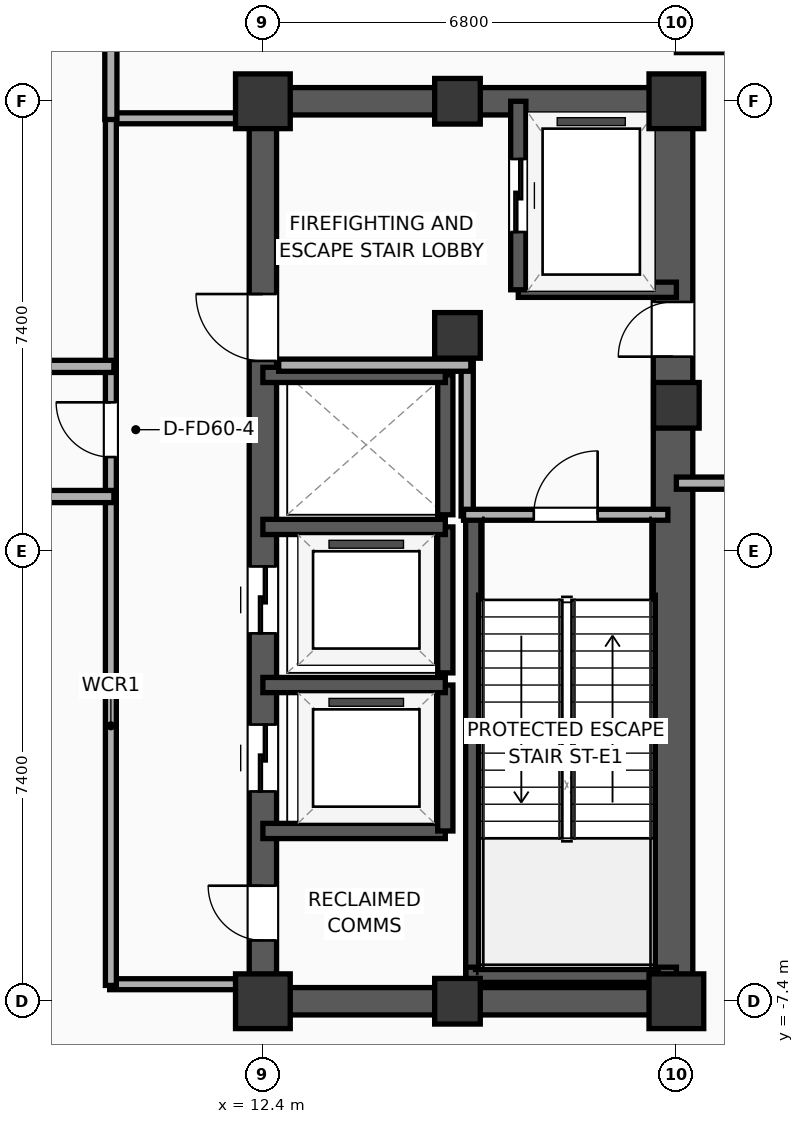
"""IFC4 building model, lengths in metres.
Left out: names, types, materials, properties, quantities, classifications, styles, units other than length and angle.
Written with IfcOpenShell. Run it as: python <this file> out.ifc"""

import sys

from ifc_helpers import new_model, si_unit, direction, frame, frame_2d, origin, origin_2d, place, context, subcontext, project, spatial, rectangle, extrude, element, fill, save


model = new_model("IFC4")
c1 = context("Model", 3, precision=1e-05, world=origin(), true_north=direction((0.0, 1.0)))
c2 = subcontext(c1, "Body", "Model", "MODEL_VIEW")
j1 = project(units=[si_unit("LENGTHUNIT", "METRE"), si_unit("PLANEANGLEUNIT", "RADIAN")], contexts=[c1])
p1 = place(None, origin())
s1 = spatial("IfcSite", under=j1, at=p1, CompositionType="ELEMENT")
p2 = place(p1, origin())
s2 = spatial("IfcBuilding", under=s1, at=p2, CompositionType="ELEMENT")
p3 = place(p2, frame((0.0, 0.0, 195.0)))
s3 = spatial("IfcBuildingStorey", under=s2, at=p3, CompositionType="ELEMENT", Elevation=195.0)
p4 = place(p3, frame((12.4, -7.4, 0.0), z_axis=(0.0, 0.0, 1.0), x_axis=(1.0, 0.0, 0.0)))
e1 = element("IfcColumn", 1, at=p4, inside=s3, PredefinedType="COLUMN", context=c2, shape_type="SweptSolid", body=[
    extrude(rectangle(XDim=0.9, YDim=0.9, at=origin_2d()), origin(), (0.0, 0.0, 1.0), 5.2),
])
p5 = place(p3, frame((15.6, 3.55, 0.0), z_axis=(0.0, 0.0, 1.0), x_axis=(1.0, 0.0, 0.0)))
e2 = element("IfcColumn", 2, at=p5, inside=s3, PredefinedType="COLUMN", context=c2, shape_type="SweptSolid", body=[
    extrude(rectangle(XDim=0.75, YDim=0.75, at=origin_2d()), origin(), (0.0, 0.0, 1.0), 5.2),
])
p6 = place(p3, frame((12.4, 7.4, 0.0), z_axis=(0.0, 0.0, 1.0), x_axis=(1.0, 0.0, 0.0)))
e3 = element("IfcColumn", 3, at=p6, inside=s3, PredefinedType="COLUMN", context=c2, shape_type="SweptSolid", body=[
    extrude(rectangle(XDim=0.9, YDim=0.9, at=origin_2d()), origin(), (0.0, 0.0, 1.0), 5.2),
])
for number, where, z_axis, x_axis in (
    (4, (15.6, -7.4, 0.0), (0.0, 0.0, 1.0), (1.0, 0.0, 0.0)),
    (5, (15.6, 7.4, 0.0), (0.0, 0.0, 1.0), (1.0, 0.0, 0.0)),
):
    element("IfcColumn", number, at=place(p3, frame(where, z_axis=z_axis, x_axis=x_axis)), inside=s3, PredefinedType="COLUMN", context=c2, shape_type="SweptSolid", body=[
        extrude(rectangle(XDim=0.75, YDim=0.75, at=origin_2d()), origin(), (0.0, 0.0, 1.0), 5.2),
    ])
p7 = place(p3, frame((19.2, -7.4, 0.0), z_axis=(0.0, 0.0, 1.0), x_axis=(1.0, 0.0, 0.0)))
e6 = element("IfcColumn", 6, at=p7, inside=s3, PredefinedType="COLUMN", context=c2, shape_type="SweptSolid", body=[
    extrude(rectangle(XDim=0.9, YDim=0.9, at=origin_2d()), origin(), (0.0, 0.0, 1.0), 5.2),
])
p8 = place(p3, frame((19.2, 2.4, 0.0), z_axis=(0.0, 0.0, 1.0), x_axis=(1.0, 0.0, 0.0)))
e7 = element("IfcColumn", 7, at=p8, inside=s3, PredefinedType="COLUMN", context=c2, shape_type="SweptSolid", body=[
    extrude(rectangle(XDim=0.75, YDim=0.75, at=origin_2d()), origin(), (0.0, 0.0, 1.0), 5.2),
])
p9 = place(p3, frame((19.2, 7.4, 0.0), z_axis=(0.0, 0.0, 1.0), x_axis=(1.0, 0.0, 0.0)))
e8 = element("IfcColumn", 8, at=p9, inside=s3, PredefinedType="COLUMN", context=c2, shape_type="SweptSolid", body=[
    extrude(rectangle(XDim=0.9, YDim=0.9, at=origin_2d()), origin(), (0.0, 0.0, 1.0), 5.2),
])
for number, where, z_axis, x_axis in (
    (9, (12.175, -7.4, 0.0), (0.0, 0.0, 1.0), (1.0, 0.0, 0.0)),
    (10, (12.175, 7.4, 0.0), (0.0, 0.0, 1.0), (1.0, 0.0, 0.0)),
):
    element("IfcWall", number, at=place(p3, frame(where, z_axis=z_axis, x_axis=x_axis)), inside=s3, PredefinedType="SHEAR", context=c2, shape_type="SweptSolid", body=[
        extrude(rectangle(XDim=7.25, YDim=0.45, at=frame_2d((3.625, 0.0))), origin(), (0.0, 0.0, 1.0), 4.8),
    ])
p10 = place(p3, frame((12.4, -7.4, 0.0), z_axis=(0.0, 0.0, 1.0), x_axis=(0.0, 1.0, 0.0)))
e11 = element("IfcWall", 11, at=p10, inside=s3, PredefinedType="SHEAR", context=c2, shape_type="SweptSolid", body=[
    extrude(rectangle(XDim=14.8, YDim=0.45, at=frame_2d((7.4, 0.0))), origin(), (0.0, 0.0, 1.0), 4.8),
])
p11 = place(p10, frame((3.45, 0.0, 0.0)))
e12 = element("IfcOpeningElement", 12, at=p11, cuts=e11, PredefinedType="OPENING", context=c2, shape_type="SweptSolid", body=[
    extrude(rectangle(XDim=1.1, YDim=2.05, at=frame_2d((0.55, 1.025))), frame((0.0, 0.235, 0.0), z_axis=(0.0, -1.0, 0.0), x_axis=(1.0, 0.0, 0.0)), (0.0, 0.0, 1.0), 0.47),
])
p12 = place(p10, frame((6.05, 0.0, 0.0)))
e13 = element("IfcOpeningElement", 13, at=p12, cuts=e11, PredefinedType="OPENING", context=c2, shape_type="SweptSolid", body=[
    extrude(rectangle(XDim=1.1, YDim=2.05, at=frame_2d((0.55, 1.025))), frame((0.0, 0.235, 0.0), z_axis=(0.0, -1.0, 0.0), x_axis=(1.0, 0.0, 0.0)), (0.0, 0.0, 1.0), 0.47),
])
p13 = place(p10, frame((10.53, 0.0, 0.0)))
e14 = element("IfcOpeningElement", 14, at=p13, cuts=e11, PredefinedType="OPENING", context=c2, shape_type="SweptSolid", body=[
    extrude(rectangle(XDim=1.1, YDim=2.05, at=frame_2d((0.55, 1.025))), frame((0.0, 0.235, 0.0), z_axis=(0.0, -1.0, 0.0), x_axis=(1.0, 0.0, 0.0)), (0.0, 0.0, 1.0), 0.47),
])
p14 = place(p10, frame((1.0, 0.0, 0.0)))
e15 = element("IfcOpeningElement", 15, at=p14, cuts=e11, PredefinedType="OPENING", context=c2, shape_type="SweptSolid", body=[
    extrude(rectangle(XDim=0.9, YDim=2.05, at=frame_2d((0.45, 1.025))), frame((0.0, 0.235, 0.0), z_axis=(0.0, -1.0, 0.0), x_axis=(1.0, 0.0, 0.0)), (0.0, 0.0, 1.0), 0.47),
])
p15 = place(p3, frame((19.145, -7.4, 0.0), z_axis=(0.0, 0.0, 1.0), x_axis=(0.0, 1.0, 0.0)))
e16 = element("IfcWall", 16, at=p15, inside=s3, PredefinedType="SHEAR", context=c2, shape_type="SweptSolid", body=[
    extrude(rectangle(XDim=14.8, YDim=0.65, at=frame_2d((7.4, 0.0))), origin(), (0.0, 0.0, 1.0), 4.8),
])
p16 = place(p15, frame((10.6, 0.0, 0.0)))
e17 = element("IfcOpeningElement", 17, at=p16, cuts=e16, PredefinedType="OPENING", context=c2, shape_type="SweptSolid", body=[
    extrude(rectangle(XDim=0.9, YDim=2.05, at=frame_2d((0.45, 1.025))), frame((0.0, 0.335, 0.0), z_axis=(0.0, -1.0, 0.0), x_axis=(1.0, 0.0, 0.0)), (0.0, 0.0, 1.0), 0.67),
])
p17 = place(p3, frame((15.86, -7.085, 0.0), z_axis=(0.0, 0.0, 1.0), x_axis=(0.0, 1.0, 0.0)))
e18 = element("IfcWall", 18, at=p17, inside=s3, PredefinedType="SOLIDWALL", context=c2, shape_type="SweptSolid", body=[
    extrude(rectangle(XDim=7.685, YDim=0.25, at=frame_2d((3.843, 0.0))), origin(), (0.0, 0.0, 1.0), 4.8),
])
p18 = place(p3, frame((15.74, -6.965, 0.0), z_axis=(0.0, 0.0, 1.0), x_axis=(1.0, 0.0, 0.0)))
e19 = element("IfcWall", 19, at=p18, inside=s3, PredefinedType="SOLIDWALL", context=c2, shape_type="SweptSolid", body=[
    extrude(rectangle(XDim=3.46, YDim=0.25, at=frame_2d((1.73, 0.0))), origin(), (0.0, 0.0, 1.0), 4.8),
])
p19 = place(p3, frame((16.6, 4.3, 0.0), z_axis=(0.0, 0.0, 1.0), x_axis=(1.0, 0.0, 0.0)))
e20 = element("IfcWall", 20, at=p19, inside=s3, PredefinedType="SOLIDWALL", context=c2, shape_type="SweptSolid", body=[
    extrude(rectangle(XDim=2.6, YDim=0.25, at=frame_2d((1.3, 0.0))), origin(), (0.0, 0.0, 1.0), 4.8),
])
p20 = place(p3, frame((16.6, 7.4, 0.0), z_axis=(0.0, 0.0, 1.0), x_axis=(0.0, -1.0, 0.0)))
e21 = element("IfcWall", 21, at=p20, inside=s3, PredefinedType="SOLIDWALL", context=c2, shape_type="SweptSolid", body=[
    extrude(rectangle(XDim=3.1, YDim=0.25, at=frame_2d((1.55, 0.0))), origin(), (0.0, 0.0, 1.0), 4.8),
])
p21 = place(p20, frame((0.95, 0.0, 0.0)))
e22 = element("IfcOpeningElement", 22, at=p21, cuts=e21, PredefinedType="OPENING", context=c2, shape_type="SweptSolid", body=[
    extrude(rectangle(XDim=1.2, YDim=2.05, at=frame_2d((0.6, 1.025))), frame((0.0, 0.135, 0.0), z_axis=(0.0, -1.0, 0.0), x_axis=(1.0, 0.0, 0.0)), (0.0, 0.0, 1.0), 0.27),
])
p22 = place(p3, frame((12.4, -4.6, 0.0), z_axis=(0.0, 0.0, 1.0), x_axis=(1.0, 0.0, 0.0)))
e23 = element("IfcWall", 23, at=p22, inside=s3, PredefinedType="SOLIDWALL", context=c2, shape_type="SweptSolid", body=[
    extrude(rectangle(XDim=3.0, YDim=0.25, at=frame_2d((1.5, 0.0))), origin(), (0.0, 0.0, 1.0), 4.8),
])
p23 = place(p3, frame((15.4, -4.6, 0.0), z_axis=(0.0, 0.0, 1.0), x_axis=(0.0, 1.0, 0.0)))
e24 = element("IfcWall", 24, at=p23, inside=s3, PredefinedType="SOLIDWALL", context=c2, shape_type="SweptSolid", body=[
    extrude(rectangle(XDim=2.4, YDim=0.25, at=frame_2d((1.2, 0.0))), origin(), (0.0, 0.0, 1.0), 4.8),
])
p24 = place(p3, frame((15.4, -2.2, 0.0), z_axis=(0.0, 0.0, 1.0), x_axis=(-1.0, 0.0, 0.0)))
e25 = element("IfcWall", 25, at=p24, inside=s3, PredefinedType="SOLIDWALL", context=c2, shape_type="SweptSolid", body=[
    extrude(rectangle(XDim=3.0, YDim=0.25, at=frame_2d((1.5, 0.0))), origin(), (0.0, 0.0, 1.0), 4.8),
])
p25 = place(p3, frame((15.4, -2.0, 0.0), z_axis=(0.0, 0.0, 1.0), x_axis=(0.0, 1.0, 0.0)))
e26 = element("IfcWall", 26, at=p25, inside=s3, PredefinedType="SOLIDWALL", context=c2, shape_type="SweptSolid", body=[
    extrude(rectangle(XDim=2.4, YDim=0.25, at=frame_2d((1.2, 0.0))), origin(), (0.0, 0.0, 1.0), 4.8),
])
p26 = place(p3, frame((15.4, 0.4, 0.0), z_axis=(0.0, 0.0, 1.0), x_axis=(-1.0, 0.0, 0.0)))
e27 = element("IfcWall", 27, at=p26, inside=s3, PredefinedType="SOLIDWALL", context=c2, shape_type="SweptSolid", body=[
    extrude(rectangle(XDim=3.0, YDim=0.25, at=frame_2d((1.5, 0.0))), origin(), (0.0, 0.0, 1.0), 4.8),
])
p27 = place(p3, frame((15.4, 0.6, 0.0), z_axis=(0.0, 0.0, 1.0), x_axis=(0.0, 1.0, 0.0)))
e28 = element("IfcWall", 28, at=p27, inside=s3, PredefinedType="SOLIDWALL", context=c2, shape_type="SweptSolid", body=[
    extrude(rectangle(XDim=2.3, YDim=0.25, at=frame_2d((1.15, 0.0))), origin(), (0.0, 0.0, 1.0), 4.8),
])
p28 = place(p3, frame((15.4, 2.9, 0.0), z_axis=(0.0, 0.0, 1.0), x_axis=(-1.0, 0.0, 0.0)))
e29 = element("IfcWall", 29, at=p28, inside=s3, PredefinedType="SOLIDWALL", context=c2, shape_type="SweptSolid", body=[
    extrude(rectangle(XDim=3.0, YDim=0.25, at=frame_2d((1.5, 0.0))), origin(), (0.0, 0.0, 1.0), 4.8),
])
p29 = place(p3, frame((15.76, 0.58, 0.0), z_axis=(0.0, 0.0, 1.0), x_axis=(0.0, 1.0, 0.0)))
e30 = element("IfcWall", 30, at=p29, inside=s3, PredefinedType="PARTITIONING", context=c2, shape_type="SweptSolid", body=[
    extrude(rectangle(XDim=2.52, YDim=0.2, at=frame_2d((1.26, 0.0))), origin(), (0.0, 0.0, 1.0), 4.8),
])
p30 = place(p3, frame((12.66, 3.06, 0.0), z_axis=(0.0, 0.0, 1.0), x_axis=(1.0, 0.0, 0.0)))
e31 = element("IfcWall", 31, at=p30, inside=s3, PredefinedType="PARTITIONING", context=c2, shape_type="SweptSolid", body=[
    extrude(rectangle(XDim=3.16, YDim=0.2, at=frame_2d((1.58, 0.0))), origin(), (0.0, 0.0, 1.0), 4.8),
])
p31 = place(p3, frame((15.7, 0.6, 0.0), z_axis=(0.0, 0.0, 1.0), x_axis=(1.0, 0.0, 0.0)))
e32 = element("IfcWall", 32, at=p31, inside=s3, PredefinedType="PARTITIONING", context=c2, shape_type="SweptSolid", body=[
    extrude(rectangle(XDim=3.36, YDim=0.18, at=frame_2d((1.68, 0.0))), origin(), (0.0, 0.0, 1.0), 4.8),
])
p32 = place(p31, frame((1.155, 0.0, 0.0)))
e33 = element("IfcOpeningElement", 33, at=p32, cuts=e32, PredefinedType="OPENING", context=c2, shape_type="SweptSolid", body=[
    extrude(rectangle(XDim=1.05, YDim=2.05, at=frame_2d((0.525, 1.025))), frame((0.0, 0.1, 0.0), z_axis=(0.0, -1.0, 0.0), x_axis=(1.0, 0.0, 0.0)), (0.0, 0.0, 1.0), 0.2),
])
for number, where, z_axis, x_axis in (
    (34, (9.88, 7.12, 0.0), (0.0, 0.0, 1.0), (1.0, 0.0, 0.0)),
    (35, (9.88, -7.12, 0.0), (0.0, 0.0, 1.0), (1.0, 0.0, 0.0)),
):
    element("IfcWall", number, at=place(p3, frame(where, z_axis=z_axis, x_axis=x_axis)), inside=s3, PredefinedType="PARTITIONING", context=c2, shape_type="SweptSolid", body=[
        extrude(rectangle(XDim=2.27, YDim=0.18, at=frame_2d((1.135, 0.0))), origin(), (0.0, 0.0, 1.0), 3.84),
    ])
p33 = place(p3, frame((9.9, -7.14, 0.0), z_axis=(0.0, 0.0, 1.0), x_axis=(0.0, 1.0, 0.0)))
e36 = element("IfcWall", 36, at=p33, inside=s3, PredefinedType="PARTITIONING", context=c2, shape_type="SweptSolid", body=[
    extrude(rectangle(XDim=14.28, YDim=0.18, at=frame_2d((7.14, 0.0))), origin(), (0.0, 0.0, 1.0), 4.8),
])
p34 = place(p33, frame((8.689, 0.0, 0.0)))
e37 = element("IfcOpeningElement", 37, at=p34, cuts=e36, PredefinedType="OPENING", context=c2, shape_type="SweptSolid", body=[
    extrude(rectangle(XDim=0.9, YDim=2.05, at=frame_2d((0.45, 1.025))), frame((0.0, 0.1, 0.0), z_axis=(0.0, -1.0, 0.0), x_axis=(1.0, 0.0, 0.0)), (0.0, 0.0, 1.0), 0.2),
])
p35 = place(p3, frame((-9.95, 3.04, 0.0), z_axis=(0.0, 0.0, 1.0), x_axis=(1.0, 0.0, 0.0)))
e38 = element("IfcWall", 38, at=p35, inside=s3, PredefinedType="PARTITIONING", context=c2, shape_type="SweptSolid", body=[
    extrude(rectangle(XDim=19.9, YDim=0.2, at=frame_2d((9.95, 0.0))), origin(), (0.0, 0.0, 1.0), 4.8),
])
p36 = place(p35, frame((9.425, 0.0, 0.0)))
e39 = element("IfcOpeningElement", 39, at=p36, cuts=e38, PredefinedType="OPENING", context=c2, shape_type="SweptSolid", body=[
    extrude(rectangle(XDim=1.05, YDim=2.05, at=frame_2d((0.525, 1.025))), frame((0.0, 0.11, 0.0), z_axis=(0.0, -1.0, 0.0), x_axis=(1.0, 0.0, 0.0)), (0.0, 0.0, 1.0), 0.22),
])
p37 = place(p3, frame((-9.95, 0.9, 0.0), z_axis=(0.0, 0.0, 1.0), x_axis=(1.0, 0.0, 0.0)))
e40 = element("IfcWall", 40, at=p37, inside=s3, PredefinedType="PARTITIONING", context=c2, shape_type="SweptSolid", body=[
    extrude(rectangle(XDim=19.9, YDim=0.2, at=frame_2d((9.95, 0.0))), origin(), (0.0, 0.0, 1.0), 4.8),
])
p38 = place(p37, frame((9.425, 0.0, 0.0)))
e41 = element("IfcOpeningElement", 41, at=p38, cuts=e40, PredefinedType="OPENING", context=c2, shape_type="SweptSolid", body=[
    extrude(rectangle(XDim=1.05, YDim=2.05, at=frame_2d((0.525, 1.025))), frame((0.0, 0.11, 0.0), z_axis=(0.0, -1.0, 0.0), x_axis=(1.0, 0.0, 0.0)), (0.0, 0.0, 1.0), 0.22),
])
p39 = place(p3, frame((19.2, 1.12, 0.0), z_axis=(0.0, 0.0, 1.0), x_axis=(1.0, 0.0, 0.0)))
e42 = element("IfcWall", 42, at=p39, inside=s3, PredefinedType="PARTITIONING", context=c2, shape_type="SweptSolid", body=[
    extrude(rectangle(XDim=11.03, YDim=0.2, at=frame_2d((5.515, 0.0))), origin(), (0.0, 0.0, 1.0), 4.8),
])
p40 = place(p3, frame((9.9, 7.1, 0.0), z_axis=(0.0, 0.0, 1.0), x_axis=(0.0, 1.0, 0.0)))
e43 = element("IfcWall", 43, at=p40, inside=s3, PredefinedType="PARTITIONING", context=c2, shape_type="SweptSolid", body=[
    extrude(rectangle(XDim=12.93, YDim=0.2, at=frame_2d((6.465, 0.0))), origin(), (0.0, 0.0, 1.0), 4.8),
])
p41 = place(p40, frame((6.974, 0.0, 0.0)))
e44 = element("IfcOpeningElement", 44, at=p41, cuts=e43, PredefinedType="OPENING", context=c2, shape_type="SweptSolid", body=[
    extrude(rectangle(XDim=1.05, YDim=2.05, at=frame_2d((0.525, 1.025))), frame((0.0, 0.11, 0.0), z_axis=(0.0, -1.0, 0.0), x_axis=(1.0, 0.0, 0.0)), (0.0, 0.0, 1.0), 0.22),
])
p42 = place(p21, origin())
e45 = element("IfcDoor", 45, at=p42, inside=s3, OperationType="SLIDING_TO_LEFT", PredefinedType="DOOR", context=c2, shape_type="SweptSolid", body=[
    extrude(rectangle(XDim=1.2, YDim=2.05, at=frame_2d((0.6, 1.025))), frame((0.0, 0.025, 0.0), z_axis=(0.0, -1.0, 0.0), x_axis=(1.0, 0.0, 0.0)), (0.0, 0.0, 1.0), 0.05),
])
fill(e22, e45)
p43 = place(p11, origin())
e46 = element("IfcDoor", 46, at=p43, inside=s3, OperationType="SLIDING_TO_LEFT", PredefinedType="DOOR", context=c2, shape_type="SweptSolid", body=[
    extrude(rectangle(XDim=1.1, YDim=2.05, at=frame_2d((0.55, 1.025))), frame((0.0, 0.025, 0.0), z_axis=(0.0, -1.0, 0.0), x_axis=(1.0, 0.0, 0.0)), (0.0, 0.0, 1.0), 0.05),
])
fill(e12, e46)
p44 = place(p12, origin())
e47 = element("IfcDoor", 47, at=p44, inside=s3, OperationType="SLIDING_TO_LEFT", PredefinedType="DOOR", context=c2, shape_type="SweptSolid", body=[
    extrude(rectangle(XDim=1.1, YDim=2.05, at=frame_2d((0.55, 1.025))), frame((0.0, 0.025, 0.0), z_axis=(0.0, -1.0, 0.0), x_axis=(1.0, 0.0, 0.0)), (0.0, 0.0, 1.0), 0.05),
])
fill(e13, e47)
p45 = place(p32, origin())
e48 = element("IfcDoor", 48, at=p45, inside=s3, OperationType="SINGLE_SWING_RIGHT", PredefinedType="DOOR", context=c2, shape_type="SweptSolid", body=[
    extrude(rectangle(XDim=1.05, YDim=2.05, at=frame_2d((0.525, 1.025))), frame((0.0, 0.025, 0.0), z_axis=(0.0, -1.0, 0.0), x_axis=(1.0, 0.0, 0.0)), (0.0, 0.0, 1.0), 0.05),
])
fill(e33, e48)
p46 = place(p34, origin())
e49 = element("IfcDoor", 49, at=p46, inside=s3, OperationType="SINGLE_SWING_RIGHT", PredefinedType="DOOR", context=c2, shape_type="SweptSolid", body=[
    extrude(rectangle(XDim=0.9, YDim=2.05, at=frame_2d((0.45, 1.025))), frame((0.0, 0.025, 0.0), z_axis=(0.0, -1.0, 0.0), x_axis=(1.0, 0.0, 0.0)), (0.0, 0.0, 1.0), 0.05),
])
fill(e37, e49)
p47 = place(p13, origin())
e50 = element("IfcDoor", 50, at=p47, inside=s3, OperationType="SINGLE_SWING_RIGHT", PredefinedType="DOOR", context=c2, shape_type="SweptSolid", body=[
    extrude(rectangle(XDim=1.1, YDim=2.05, at=frame_2d((0.55, 1.025))), frame((0.0, 0.025, 0.0), z_axis=(0.0, -1.0, 0.0), x_axis=(1.0, 0.0, 0.0)), (0.0, 0.0, 1.0), 0.05),
])
fill(e14, e50)
p48 = place(p16, origin())
e51 = element("IfcDoor", 51, at=p48, inside=s3, OperationType="SINGLE_SWING_LEFT", PredefinedType="DOOR", context=c2, shape_type="SweptSolid", body=[
    extrude(rectangle(XDim=0.9, YDim=2.05, at=frame_2d((0.45, 1.025))), frame((0.0, 0.025, 0.0), z_axis=(0.0, -1.0, 0.0), x_axis=(1.0, 0.0, 0.0)), (0.0, 0.0, 1.0), 0.05),
])
fill(e17, e51)
p49 = place(p14, origin())
e52 = element("IfcDoor", 52, at=p49, inside=s3, OperationType="SINGLE_SWING_RIGHT", PredefinedType="DOOR", context=c2, shape_type="SweptSolid", body=[
    extrude(rectangle(XDim=0.9, YDim=2.05, at=frame_2d((0.45, 1.025))), frame((0.0, 0.025, 0.0), z_axis=(0.0, -1.0, 0.0), x_axis=(1.0, 0.0, 0.0)), (0.0, 0.0, 1.0), 0.05),
])
fill(e15, e52)
save(model, sys.argv[1])
